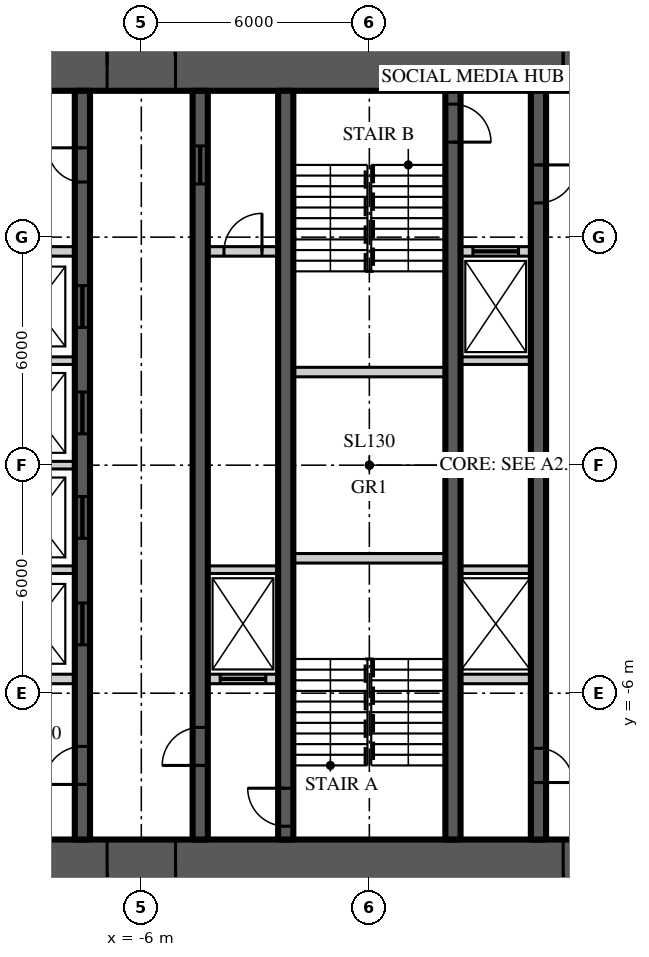
"""IFC4 building model, lengths in metres.
Left out: names, types, materials, properties, quantities, classifications, styles, units other than length and angle.
Written with IfcOpenShell. Run it as: python <this file> out.ifc"""

import sys

from ifc_helpers import new_model, si_unit, direction, frame, frame_2d, origin, place, context, subcontext, project, spatial, rectangle, extrude, element, fill, save


model = new_model("IFC4")
c1 = context("Model", 3, precision=1e-05, world=origin(), true_north=direction((0.0, 1.0)))
c2 = subcontext(c1, "Body", "Model", "MODEL_VIEW")
j1 = project(units=[si_unit("LENGTHUNIT", "METRE"), si_unit("PLANEANGLEUNIT", "RADIAN")], contexts=[c1])
p1 = place(None, origin())
s1 = spatial("IfcSite", under=j1, at=p1, CompositionType="ELEMENT")
p2 = place(p1, origin())
s2 = spatial("IfcBuilding", under=s1, at=p2, CompositionType="ELEMENT")
p3 = place(p2, frame((0.0, 0.0, 66.9)))
s3 = spatial("IfcBuildingStorey", under=s2, at=p3, CompositionType="ELEMENT", Elevation=66.9)
p4 = place(p3, frame((-11.15, 10.5, 0.0), z_axis=(0.0, 0.0, 1.0), x_axis=(1.0, 0.0, 0.0)))
e1 = element("IfcWall", 1, at=p4, inside=s3, PredefinedType="SHEAR", context=c2, shape_type="SweptSolid", body=[
    extrude(rectangle(XDim=22.3, YDim=1.3, at=frame_2d((11.15, 0.0))), origin(), (0.0, 0.0, 1.0), 3.9),
])
p5 = place(p4, frame((4.25, 0.0, 0.0)))
e2 = element("IfcOpeningElement", 2, at=p5, cuts=e1, PredefinedType="OPENING", context=c2, shape_type="SweptSolid", body=[
    extrude(rectangle(XDim=1.8, YDim=2.2, at=frame_2d((0.9, 1.1))), frame((0.0, 0.66, 0.0), z_axis=(0.0, -1.0, 0.0), x_axis=(1.0, 0.0, 0.0)), (0.0, 0.0, 1.0), 1.32),
])
p6 = place(p4, frame((16.25, 0.0, 0.0)))
e3 = element("IfcOpeningElement", 3, at=p6, cuts=e1, PredefinedType="OPENING", context=c2, shape_type="SweptSolid", body=[
    extrude(rectangle(XDim=1.8, YDim=2.2, at=frame_2d((0.9, 1.1))), frame((0.0, 0.66, 0.0), z_axis=(0.0, -1.0, 0.0), x_axis=(1.0, 0.0, 0.0)), (0.0, 0.0, 1.0), 1.32),
])
p7 = place(p3, frame((11.15, -10.5, 0.0), z_axis=(0.0, 0.0, 1.0), x_axis=(-1.0, 0.0, 0.0)))
e4 = element("IfcWall", 4, at=p7, inside=s3, PredefinedType="SHEAR", context=c2, shape_type="SweptSolid", body=[
    extrude(rectangle(XDim=22.3, YDim=1.3, at=frame_2d((11.15, 0.0))), origin(), (0.0, 0.0, 1.0), 3.9),
])
p8 = place(p7, frame((16.25, 0.0, 0.0)))
e5 = element("IfcOpeningElement", 5, at=p8, cuts=e4, PredefinedType="OPENING", context=c2, shape_type="SweptSolid", body=[
    extrude(rectangle(XDim=1.8, YDim=2.2, at=frame_2d((0.9, 1.1))), frame((0.0, 0.66, 0.0), z_axis=(0.0, -1.0, 0.0), x_axis=(1.0, 0.0, 0.0)), (0.0, 0.0, 1.0), 1.32),
])
p9 = place(p7, frame((4.25, 0.0, 0.0)))
e6 = element("IfcOpeningElement", 6, at=p9, cuts=e4, PredefinedType="OPENING", context=c2, shape_type="SweptSolid", body=[
    extrude(rectangle(XDim=1.8, YDim=2.2, at=frame_2d((0.9, 1.1))), frame((0.0, 0.66, 0.0), z_axis=(0.0, -1.0, 0.0), x_axis=(1.0, 0.0, 0.0)), (0.0, 0.0, 1.0), 1.32),
])
p10 = place(p3, frame((-7.55, -9.85, 0.0), z_axis=(0.0, 0.0, 1.0), x_axis=(0.0, 1.0, 0.0)))
e7 = element("IfcWall", 7, at=p10, inside=s3, PredefinedType="SHEAR", context=c2, shape_type="SweptSolid", body=[
    extrude(rectangle(XDim=19.7, YDim=0.4, at=frame_2d((9.85, 0.0))), origin(), (0.0, 0.0, 1.0), 3.9),
])
p11 = place(p10, frame((1.45, 0.0, 0.0)))
e8 = element("IfcOpeningElement", 8, at=p11, cuts=e7, PredefinedType="OPENING", context=c2, shape_type="SweptSolid", body=[
    extrude(rectangle(XDim=1.0, YDim=2.2, at=frame_2d((0.5, 1.1))), frame((0.0, 0.21, 0.0), z_axis=(0.0, -1.0, 0.0), x_axis=(1.0, 0.0, 0.0)), (0.0, 0.0, 1.0), 0.42),
])
p12 = place(p10, frame((17.3, 0.0, 0.0)))
e9 = element("IfcOpeningElement", 9, at=p12, cuts=e7, PredefinedType="OPENING", context=c2, shape_type="SweptSolid", body=[
    extrude(rectangle(XDim=0.9, YDim=2.1, at=frame_2d((0.45, 1.05))), frame((0.0, 0.21, 0.0), z_axis=(0.0, -1.0, 0.0), x_axis=(1.0, 0.0, 0.0)), (0.0, 0.0, 1.0), 0.42),
])
p13 = place(p10, frame((5.125, 0.0, 0.0)))
e10 = element("IfcOpeningElement", 10, at=p13, cuts=e7, PredefinedType="OPENING", context=c2, shape_type="SweptSolid", body=[
    extrude(rectangle(XDim=1.1, YDim=2.2, at=frame_2d((0.55, 1.1))), frame((0.0, 0.21, 0.0), z_axis=(0.0, -1.0, 0.0), x_axis=(1.0, 0.0, 0.0)), (0.0, 0.0, 1.0), 0.42),
])
p14 = place(p10, frame((7.925, 0.0, 0.0)))
e11 = element("IfcOpeningElement", 11, at=p14, cuts=e7, PredefinedType="OPENING", context=c2, shape_type="SweptSolid", body=[
    extrude(rectangle(XDim=1.1, YDim=2.2, at=frame_2d((0.55, 1.1))), frame((0.0, 0.21, 0.0), z_axis=(0.0, -1.0, 0.0), x_axis=(1.0, 0.0, 0.0)), (0.0, 0.0, 1.0), 0.42),
])
p15 = place(p10, frame((10.675, 0.0, 0.0)))
e12 = element("IfcOpeningElement", 12, at=p15, cuts=e7, PredefinedType="OPENING", context=c2, shape_type="SweptSolid", body=[
    extrude(rectangle(XDim=1.1, YDim=2.2, at=frame_2d((0.55, 1.1))), frame((0.0, 0.21, 0.0), z_axis=(0.0, -1.0, 0.0), x_axis=(1.0, 0.0, 0.0)), (0.0, 0.0, 1.0), 0.42),
])
p16 = place(p10, frame((13.475, 0.0, 0.0)))
e13 = element("IfcOpeningElement", 13, at=p16, cuts=e7, PredefinedType="OPENING", context=c2, shape_type="SweptSolid", body=[
    extrude(rectangle(XDim=1.1, YDim=2.2, at=frame_2d((0.55, 1.1))), frame((0.0, 0.21, 0.0), z_axis=(0.0, -1.0, 0.0), x_axis=(1.0, 0.0, 0.0)), (0.0, 0.0, 1.0), 0.42),
])
p17 = place(p3, frame((-4.45, -9.85, 0.0), z_axis=(0.0, 0.0, 1.0), x_axis=(0.0, 1.0, 0.0)))
e14 = element("IfcWall", 14, at=p17, inside=s3, PredefinedType="SHEAR", context=c2, shape_type="SweptSolid", body=[
    extrude(rectangle(XDim=19.7, YDim=0.4, at=frame_2d((9.85, 0.0))), origin(), (0.0, 0.0, 1.0), 3.9),
])
p18 = place(p17, frame((1.95, 0.0, 0.0)))
e15 = element("IfcOpeningElement", 15, at=p18, cuts=e14, PredefinedType="OPENING", context=c2, shape_type="SweptSolid", body=[
    extrude(rectangle(XDim=1.0, YDim=2.2, at=frame_2d((0.5, 1.1))), frame((0.0, 0.21, 0.0), z_axis=(0.0, -1.0, 0.0), x_axis=(1.0, 0.0, 0.0)), (0.0, 0.0, 1.0), 0.42),
])
p19 = place(p17, frame((17.25, 0.0, 0.0)))
e16 = element("IfcOpeningElement", 16, at=p19, cuts=e14, PredefinedType="OPENING", context=c2, shape_type="SweptSolid", body=[
    extrude(rectangle(XDim=1.0, YDim=2.1, at=frame_2d((0.5, 1.05))), frame((0.0, 0.21, 0.0), z_axis=(0.0, -1.0, 0.0), x_axis=(1.0, 0.0, 0.0)), (0.0, 0.0, 1.0), 0.42),
])
p20 = place(p3, frame((4.45, 9.85, 0.0), z_axis=(0.0, 0.0, 1.0), x_axis=(0.0, -1.0, 0.0)))
e17 = element("IfcWall", 17, at=p20, inside=s3, PredefinedType="SHEAR", context=c2, shape_type="SweptSolid", body=[
    extrude(rectangle(XDim=19.7, YDim=0.4, at=frame_2d((9.85, 0.0))), origin(), (0.0, 0.0, 1.0), 3.9),
])
p21 = place(p20, frame((1.95, 0.0, 0.0)))
e18 = element("IfcOpeningElement", 18, at=p21, cuts=e17, PredefinedType="OPENING", context=c2, shape_type="SweptSolid", body=[
    extrude(rectangle(XDim=1.0, YDim=2.2, at=frame_2d((0.5, 1.1))), frame((0.0, 0.21, 0.0), z_axis=(0.0, -1.0, 0.0), x_axis=(1.0, 0.0, 0.0)), (0.0, 0.0, 1.0), 0.42),
])
p22 = place(p20, frame((17.3, 0.0, 0.0)))
e19 = element("IfcOpeningElement", 19, at=p22, cuts=e17, PredefinedType="OPENING", context=c2, shape_type="SweptSolid", body=[
    extrude(rectangle(XDim=0.9, YDim=2.1, at=frame_2d((0.45, 1.05))), frame((0.0, 0.21, 0.0), z_axis=(0.0, -1.0, 0.0), x_axis=(1.0, 0.0, 0.0)), (0.0, 0.0, 1.0), 0.42),
])
p23 = place(p3, frame((-2.2, -9.85, 0.0), z_axis=(0.0, 0.0, 1.0), x_axis=(0.0, 1.0, 0.0)))
e20 = element("IfcWall", 20, at=p23, inside=s3, PredefinedType="SHEAR", context=c2, shape_type="SweptSolid", body=[
    extrude(rectangle(XDim=19.7, YDim=0.4, at=frame_2d((9.85, 0.0))), origin(), (0.0, 0.0, 1.0), 3.9),
])
p24 = place(p23, frame((0.35, 0.0, 0.0)))
e21 = element("IfcOpeningElement", 21, at=p24, cuts=e20, PredefinedType="OPENING", context=c2, shape_type="SweptSolid", body=[
    extrude(rectangle(XDim=1.0, YDim=2.2, at=frame_2d((0.5, 1.1))), frame((0.0, 0.21, 0.0), z_axis=(0.0, -1.0, 0.0), x_axis=(1.0, 0.0, 0.0)), (0.0, 0.0, 1.0), 0.42),
])
p25 = place(p3, frame((2.2, 9.85, 0.0), z_axis=(0.0, 0.0, 1.0), x_axis=(0.0, -1.0, 0.0)))
e22 = element("IfcWall", 22, at=p25, inside=s3, PredefinedType="SHEAR", context=c2, shape_type="SweptSolid", body=[
    extrude(rectangle(XDim=19.7, YDim=0.4, at=frame_2d((9.85, 0.0))), origin(), (0.0, 0.0, 1.0), 3.9),
])
p26 = place(p25, frame((0.35, 0.0, 0.0)))
e23 = element("IfcOpeningElement", 23, at=p26, cuts=e22, PredefinedType="OPENING", context=c2, shape_type="SweptSolid", body=[
    extrude(rectangle(XDim=1.0, YDim=2.2, at=frame_2d((0.5, 1.1))), frame((0.0, 0.21, 0.0), z_axis=(0.0, -1.0, 0.0), x_axis=(1.0, 0.0, 0.0)), (0.0, 0.0, 1.0), 0.42),
])
p27 = place(p3, frame((-9.85, 5.625, 0.0), z_axis=(0.0, 0.0, 1.0), x_axis=(1.0, 0.0, 0.0)))
e24 = element("IfcWall", 24, at=p27, inside=s3, PredefinedType="SOLIDWALL", context=c2, shape_type="SweptSolid", body=[
    extrude(rectangle(XDim=2.1, YDim=0.25, at=frame_2d((1.05, 0.0))), origin(), (0.0, 0.0, 1.0), 3.7),
])
p28 = place(p3, frame((-4.25, 5.625, 0.0), z_axis=(0.0, 0.0, 1.0), x_axis=(1.0, 0.0, 0.0)))
e25 = element("IfcWall", 25, at=p28, inside=s3, PredefinedType="SOLIDWALL", context=c2, shape_type="SweptSolid", body=[
    extrude(rectangle(XDim=1.85, YDim=0.25, at=frame_2d((0.925, 0.0))), origin(), (0.0, 0.0, 1.0), 3.7),
])
p29 = place(p28, frame((0.425, 0.0, 0.0)))
e26 = element("IfcOpeningElement", 26, at=p29, cuts=e25, PredefinedType="OPENING", context=c2, shape_type="SweptSolid", body=[
    extrude(rectangle(XDim=1.0, YDim=2.2, at=frame_2d((0.5, 1.1))), frame((0.0, 0.135, 0.0), z_axis=(0.0, -1.0, 0.0), x_axis=(1.0, 0.0, 0.0)), (0.0, 0.0, 1.0), 0.27),
])
p30 = place(p3, frame((2.4, 5.625, 0.0), z_axis=(0.0, 0.0, 1.0), x_axis=(1.0, 0.0, 0.0)))
e27 = element("IfcWall", 27, at=p30, inside=s3, PredefinedType="SOLIDWALL", context=c2, shape_type="SweptSolid", body=[
    extrude(rectangle(XDim=1.85, YDim=0.25, at=frame_2d((0.925, 0.0))), origin(), (0.0, 0.0, 1.0), 3.7),
])
p31 = place(p30, frame((0.325, 0.0, 0.0)))
e28 = element("IfcOpeningElement", 28, at=p31, cuts=e27, PredefinedType="OPENING", context=c2, shape_type="SweptSolid", body=[
    extrude(rectangle(XDim=1.2, YDim=2.2, at=frame_2d((0.6, 1.1))), frame((0.0, 0.135, 0.0), z_axis=(0.0, -1.0, 0.0), x_axis=(1.0, 0.0, 0.0)), (0.0, 0.0, 1.0), 0.27),
])
p32 = place(p3, frame((-9.85, -5.625, 0.0), z_axis=(0.0, 0.0, 1.0), x_axis=(1.0, 0.0, 0.0)))
e29 = element("IfcWall", 29, at=p32, inside=s3, PredefinedType="SOLIDWALL", context=c2, shape_type="SweptSolid", body=[
    extrude(rectangle(XDim=2.1, YDim=0.25, at=frame_2d((1.05, 0.0))), origin(), (0.0, 0.0, 1.0), 3.7),
])
p33 = place(p3, frame((-4.25, -5.625, 0.0), z_axis=(0.0, 0.0, 1.0), x_axis=(1.0, 0.0, 0.0)))
e30 = element("IfcWall", 30, at=p33, inside=s3, PredefinedType="SOLIDWALL", context=c2, shape_type="SweptSolid", body=[
    extrude(rectangle(XDim=1.85, YDim=0.25, at=frame_2d((0.925, 0.0))), origin(), (0.0, 0.0, 1.0), 3.7),
])
p34 = place(p33, frame((0.325, 0.0, 0.0)))
e31 = element("IfcOpeningElement", 31, at=p34, cuts=e30, PredefinedType="OPENING", context=c2, shape_type="SweptSolid", body=[
    extrude(rectangle(XDim=1.2, YDim=2.2, at=frame_2d((0.6, 1.1))), frame((0.0, 0.135, 0.0), z_axis=(0.0, -1.0, 0.0), x_axis=(1.0, 0.0, 0.0)), (0.0, 0.0, 1.0), 0.27),
])
p35 = place(p3, frame((2.4, -5.625, 0.0), z_axis=(0.0, 0.0, 1.0), x_axis=(1.0, 0.0, 0.0)))
e32 = element("IfcWall", 32, at=p35, inside=s3, PredefinedType="SOLIDWALL", context=c2, shape_type="SweptSolid", body=[
    extrude(rectangle(XDim=1.85, YDim=0.25, at=frame_2d((0.925, 0.0))), origin(), (0.0, 0.0, 1.0), 3.7),
])
for number, where, z_axis, x_axis in (
    (33, (-2.0, -2.45, 0.0), (0.0, 0.0, 1.0), (1.0, 0.0, 0.0)),
    (34, (-2.0, 2.45, 0.0), (0.0, 0.0, 1.0), (1.0, 0.0, 0.0)),
):
    element("IfcWall", number, at=place(p3, frame(where, z_axis=z_axis, x_axis=x_axis)), inside=s3, PredefinedType="SOLIDWALL", context=c2, shape_type="SweptSolid", body=[
        extrude(rectangle(XDim=4.0, YDim=0.25, at=frame_2d((2.0, 0.0))), origin(), (0.0, 0.0, 1.0), 3.7),
    ])
p36 = place(p3, frame((-9.85, -2.75, 0.0), z_axis=(0.0, 0.0, 1.0), x_axis=(1.0, 0.0, 0.0)))
e35 = element("IfcWall", 35, at=p36, inside=s3, PredefinedType="SOLIDWALL", context=c2, shape_type="SweptSolid", body=[
    extrude(rectangle(XDim=2.1, YDim=0.2, at=frame_2d((1.05, 0.0))), origin(), (0.0, 0.0, 1.0), 3.7),
])
for number, where, z_axis, x_axis in (
    (36, (-4.25, -2.75, 0.0), (0.0, 0.0, 1.0), (1.0, 0.0, 0.0)),
    (37, (2.4, -2.75, 0.0), (0.0, 0.0, 1.0), (1.0, 0.0, 0.0)),
):
    element("IfcWall", number, at=place(p3, frame(where, z_axis=z_axis, x_axis=x_axis)), inside=s3, PredefinedType="SOLIDWALL", context=c2, shape_type="SweptSolid", body=[
        extrude(rectangle(XDim=1.85, YDim=0.2, at=frame_2d((0.925, 0.0))), origin(), (0.0, 0.0, 1.0), 3.7),
    ])
for number, where, z_axis, x_axis in (
    (38, (-9.85, 0.0, 0.0), (0.0, 0.0, 1.0), (1.0, 0.0, 0.0)),
    (39, (-9.85, 2.75, 0.0), (0.0, 0.0, 1.0), (1.0, 0.0, 0.0)),
):
    element("IfcWall", number, at=place(p3, frame(where, z_axis=z_axis, x_axis=x_axis)), inside=s3, PredefinedType="SOLIDWALL", context=c2, shape_type="SweptSolid", body=[
        extrude(rectangle(XDim=2.1, YDim=0.2, at=frame_2d((1.05, 0.0))), origin(), (0.0, 0.0, 1.0), 3.7),
    ])
p37 = place(p3, frame((2.4, 2.75, 0.0), z_axis=(0.0, 0.0, 1.0), x_axis=(1.0, 0.0, 0.0)))
e40 = element("IfcWall", 40, at=p37, inside=s3, PredefinedType="SOLIDWALL", context=c2, shape_type="SweptSolid", body=[
    extrude(rectangle(XDim=1.85, YDim=0.2, at=frame_2d((0.925, 0.0))), origin(), (0.0, 0.0, 1.0), 3.7),
])
p38 = place(p5, origin())
e41 = element("IfcDoor", 41, at=p38, inside=s3, OperationType="DOUBLE_DOOR_DOUBLE_SWING", PredefinedType="DOOR", context=c2, shape_type="SweptSolid", body=[
    extrude(rectangle(XDim=1.8, YDim=2.2, at=frame_2d((0.9, 1.1))), frame((0.0, 0.025, 0.0), z_axis=(0.0, -1.0, 0.0), x_axis=(1.0, 0.0, 0.0)), (0.0, 0.0, 1.0), 0.05),
])
fill(e2, e41)
p39 = place(p8, origin())
e42 = element("IfcDoor", 42, at=p39, inside=s3, OperationType="DOUBLE_DOOR_DOUBLE_SWING", PredefinedType="DOOR", context=c2, shape_type="SweptSolid", body=[
    extrude(rectangle(XDim=1.8, YDim=2.2, at=frame_2d((0.9, 1.1))), frame((0.0, 0.025, 0.0), z_axis=(0.0, -1.0, 0.0), x_axis=(1.0, 0.0, 0.0)), (0.0, 0.0, 1.0), 0.05),
])
fill(e5, e42)
p40 = place(p6, origin())
e43 = element("IfcDoor", 43, at=p40, inside=s3, OperationType="DOUBLE_DOOR_DOUBLE_SWING", PredefinedType="DOOR", context=c2, shape_type="SweptSolid", body=[
    extrude(rectangle(XDim=1.8, YDim=2.2, at=frame_2d((0.9, 1.1))), frame((0.0, 0.025, 0.0), z_axis=(0.0, -1.0, 0.0), x_axis=(1.0, 0.0, 0.0)), (0.0, 0.0, 1.0), 0.05),
])
fill(e3, e43)
p41 = place(p9, origin())
e44 = element("IfcDoor", 44, at=p41, inside=s3, OperationType="DOUBLE_DOOR_DOUBLE_SWING", PredefinedType="DOOR", context=c2, shape_type="SweptSolid", body=[
    extrude(rectangle(XDim=1.8, YDim=2.2, at=frame_2d((0.9, 1.1))), frame((0.0, 0.025, 0.0), z_axis=(0.0, -1.0, 0.0), x_axis=(1.0, 0.0, 0.0)), (0.0, 0.0, 1.0), 0.05),
])
fill(e6, e44)
p42 = place(p11, origin())
e45 = element("IfcDoor", 45, at=p42, inside=s3, OperationType="SINGLE_SWING_LEFT", PredefinedType="DOOR", context=c2, shape_type="SweptSolid", body=[
    extrude(rectangle(XDim=1.0, YDim=2.2, at=frame_2d((0.5, 1.1))), frame((0.0, 0.025, 0.0), z_axis=(0.0, -1.0, 0.0), x_axis=(1.0, 0.0, 0.0)), (0.0, 0.0, 1.0), 0.05),
])
fill(e8, e45)
p43 = place(p18, origin())
e46 = element("IfcDoor", 46, at=p43, inside=s3, OperationType="SINGLE_SWING_LEFT", PredefinedType="DOOR", context=c2, shape_type="SweptSolid", body=[
    extrude(rectangle(XDim=1.0, YDim=2.2, at=frame_2d((0.5, 1.1))), frame((0.0, 0.025, 0.0), z_axis=(0.0, -1.0, 0.0), x_axis=(1.0, 0.0, 0.0)), (0.0, 0.0, 1.0), 0.05),
])
fill(e15, e46)
p44 = place(p24, origin())
e47 = element("IfcDoor", 47, at=p44, inside=s3, OperationType="SINGLE_SWING_RIGHT", PredefinedType="DOOR", context=c2, shape_type="SweptSolid", body=[
    extrude(rectangle(XDim=1.0, YDim=2.2, at=frame_2d((0.5, 1.1))), frame((0.0, 0.025, 0.0), z_axis=(0.0, -1.0, 0.0), x_axis=(1.0, 0.0, 0.0)), (0.0, 0.0, 1.0), 0.05),
])
fill(e21, e47)
p45 = place(p21, origin())
e48 = element("IfcDoor", 48, at=p45, inside=s3, OperationType="SINGLE_SWING_LEFT", PredefinedType="DOOR", context=c2, shape_type="SweptSolid", body=[
    extrude(rectangle(XDim=1.0, YDim=2.2, at=frame_2d((0.5, 1.1))), frame((0.0, 0.025, 0.0), z_axis=(0.0, -1.0, 0.0), x_axis=(1.0, 0.0, 0.0)), (0.0, 0.0, 1.0), 0.05),
])
fill(e18, e48)
p46 = place(p26, origin())
e49 = element("IfcDoor", 49, at=p46, inside=s3, OperationType="SINGLE_SWING_RIGHT", PredefinedType="DOOR", context=c2, shape_type="SweptSolid", body=[
    extrude(rectangle(XDim=1.0, YDim=2.2, at=frame_2d((0.5, 1.1))), frame((0.0, 0.025, 0.0), z_axis=(0.0, -1.0, 0.0), x_axis=(1.0, 0.0, 0.0)), (0.0, 0.0, 1.0), 0.05),
])
fill(e23, e49)
p47 = place(p12, origin())
e50 = element("IfcDoor", 50, at=p47, inside=s3, OperationType="SINGLE_SWING_RIGHT", PredefinedType="DOOR", context=c2, shape_type="SweptSolid", body=[
    extrude(rectangle(XDim=0.9, YDim=2.1, at=frame_2d((0.45, 1.05))), frame((0.0, 0.025, 0.0), z_axis=(0.0, -1.0, 0.0), x_axis=(1.0, 0.0, 0.0)), (0.0, 0.0, 1.0), 0.05),
])
fill(e9, e50)
p48 = place(p19, origin())
e51 = element("IfcDoor", 51, at=p48, inside=s3, OperationType="SLIDING_TO_LEFT", PredefinedType="DOOR", context=c2, shape_type="SweptSolid", body=[
    extrude(rectangle(XDim=1.0, YDim=2.1, at=frame_2d((0.5, 1.05))), frame((0.0, 0.025, 0.0), z_axis=(0.0, -1.0, 0.0), x_axis=(1.0, 0.0, 0.0)), (0.0, 0.0, 1.0), 0.05),
])
fill(e16, e51)
p49 = place(p22, origin())
e52 = element("IfcDoor", 52, at=p49, inside=s3, OperationType="SINGLE_SWING_RIGHT", PredefinedType="DOOR", context=c2, shape_type="SweptSolid", body=[
    extrude(rectangle(XDim=0.9, YDim=2.1, at=frame_2d((0.45, 1.05))), frame((0.0, 0.025, 0.0), z_axis=(0.0, -1.0, 0.0), x_axis=(1.0, 0.0, 0.0)), (0.0, 0.0, 1.0), 0.05),
])
fill(e19, e52)
p50 = place(p13, origin())
e53 = element("IfcDoor", 53, at=p50, inside=s3, OperationType="SLIDING_TO_LEFT", PredefinedType="DOOR", context=c2, shape_type="SweptSolid", body=[
    extrude(rectangle(XDim=1.1, YDim=2.2, at=frame_2d((0.55, 1.1))), frame((0.0, 0.025, 0.0), z_axis=(0.0, -1.0, 0.0), x_axis=(1.0, 0.0, 0.0)), (0.0, 0.0, 1.0), 0.05),
])
fill(e10, e53)
p51 = place(p14, origin())
e54 = element("IfcDoor", 54, at=p51, inside=s3, OperationType="SLIDING_TO_LEFT", PredefinedType="DOOR", context=c2, shape_type="SweptSolid", body=[
    extrude(rectangle(XDim=1.1, YDim=2.2, at=frame_2d((0.55, 1.1))), frame((0.0, 0.025, 0.0), z_axis=(0.0, -1.0, 0.0), x_axis=(1.0, 0.0, 0.0)), (0.0, 0.0, 1.0), 0.05),
])
fill(e11, e54)
p52 = place(p15, origin())
e55 = element("IfcDoor", 55, at=p52, inside=s3, OperationType="SLIDING_TO_LEFT", PredefinedType="DOOR", context=c2, shape_type="SweptSolid", body=[
    extrude(rectangle(XDim=1.1, YDim=2.2, at=frame_2d((0.55, 1.1))), frame((0.0, 0.025, 0.0), z_axis=(0.0, -1.0, 0.0), x_axis=(1.0, 0.0, 0.0)), (0.0, 0.0, 1.0), 0.05),
])
fill(e12, e55)
p53 = place(p16, origin())
e56 = element("IfcDoor", 56, at=p53, inside=s3, OperationType="SLIDING_TO_LEFT", PredefinedType="DOOR", context=c2, shape_type="SweptSolid", body=[
    extrude(rectangle(XDim=1.1, YDim=2.2, at=frame_2d((0.55, 1.1))), frame((0.0, 0.025, 0.0), z_axis=(0.0, -1.0, 0.0), x_axis=(1.0, 0.0, 0.0)), (0.0, 0.0, 1.0), 0.05),
])
fill(e13, e56)
p54 = place(p34, origin())
e57 = element("IfcDoor", 57, at=p54, inside=s3, OperationType="SLIDING_TO_LEFT", PredefinedType="DOOR", context=c2, shape_type="SweptSolid", body=[
    extrude(rectangle(XDim=1.2, YDim=2.2, at=frame_2d((0.6, 1.1))), frame((0.0, 0.025, 0.0), z_axis=(0.0, -1.0, 0.0), x_axis=(1.0, 0.0, 0.0)), (0.0, 0.0, 1.0), 0.05),
])
fill(e31, e57)
p55 = place(p31, origin())
e58 = element("IfcDoor", 58, at=p55, inside=s3, OperationType="SLIDING_TO_LEFT", PredefinedType="DOOR", context=c2, shape_type="SweptSolid", body=[
    extrude(rectangle(XDim=1.2, YDim=2.2, at=frame_2d((0.6, 1.1))), frame((0.0, 0.025, 0.0), z_axis=(0.0, -1.0, 0.0), x_axis=(1.0, 0.0, 0.0)), (0.0, 0.0, 1.0), 0.05),
])
fill(e28, e58)
p56 = place(p29, origin())
e59 = element("IfcDoor", 59, at=p56, inside=s3, OperationType="SINGLE_SWING_RIGHT", PredefinedType="DOOR", context=c2, shape_type="SweptSolid", body=[
    extrude(rectangle(XDim=1.0, YDim=2.2, at=frame_2d((0.5, 1.1))), frame((0.0, 0.025, 0.0), z_axis=(0.0, -1.0, 0.0), x_axis=(1.0, 0.0, 0.0)), (0.0, 0.0, 1.0), 0.05),
])
fill(e26, e59)
save(model, sys.argv[1])
